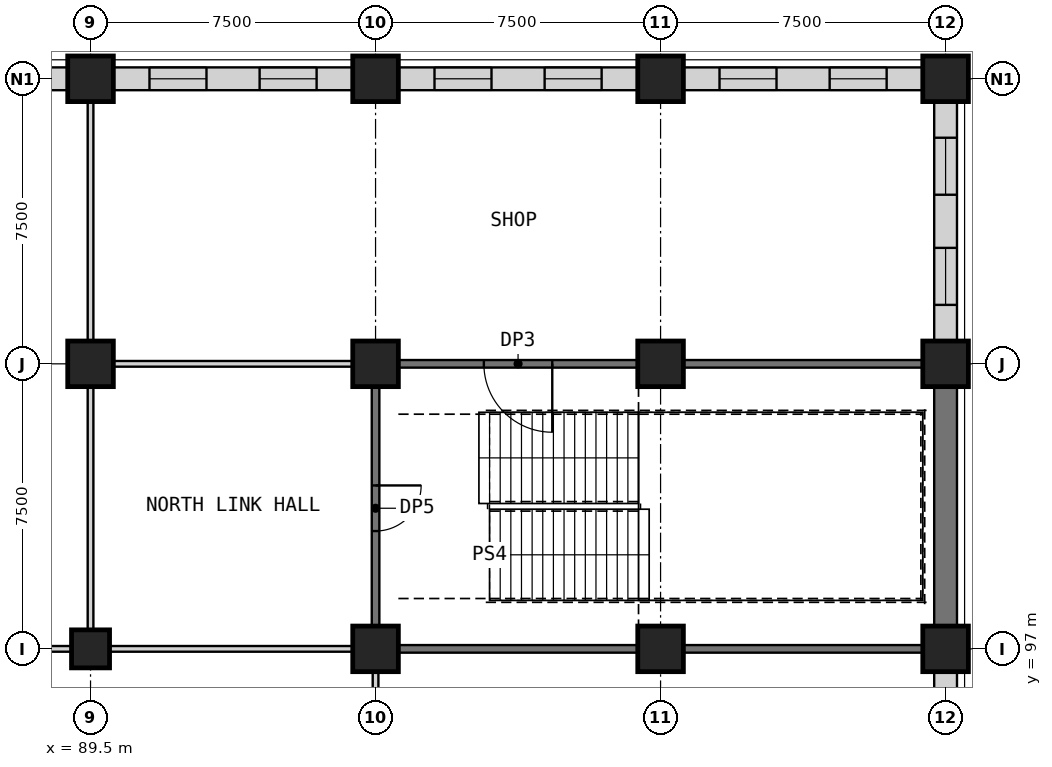
"""IFC4 building model, lengths in metres.
Left out: names, types, materials, properties, quantities, classifications, styles, units other than length and angle.
Written with IfcOpenShell. Run it as: python <this file> out.ifc"""

import sys

from ifc_helpers import new_model, si_unit, direction, frame, frame_2d, origin, origin_2d, place, context, subcontext, project, spatial, rectangle, extrude, element, fill, save


model = new_model("IFC4")
c1 = context("Model", 3, precision=1e-05, world=origin(), true_north=direction((0.0, 1.0)))
c2 = subcontext(c1, "Body", "Model", "MODEL_VIEW")
j1 = project(units=[si_unit("LENGTHUNIT", "METRE"), si_unit("PLANEANGLEUNIT", "RADIAN")], contexts=[c1])
p1 = place(None, origin())
s1 = spatial("IfcSite", under=j1, at=p1, CompositionType="ELEMENT")
p2 = place(p1, origin())
s2 = spatial("IfcBuilding", under=s1, at=p2, CompositionType="ELEMENT")
p3 = place(p2, frame((0.0, 0.0, 13.5)))
s3 = spatial("IfcBuildingStorey", under=s2, at=p3, CompositionType="ELEMENT", Elevation=13.5)
p4 = place(p3, frame((89.5, 97.0, 0.0), z_axis=(0.0, 0.0, 1.0), x_axis=(1.0, 0.0, 0.0)))
e1 = element("IfcColumn", 1, at=p4, inside=s3, PredefinedType="COLUMN", context=c2, shape_type="SweptSolid", body=[
    extrude(rectangle(XDim=1.0, YDim=1.0, at=origin_2d()), origin(), (0.0, 0.0, 1.0), 5.0),
])
for number, where, z_axis, x_axis in (
    (2, (89.5, 104.5, 0.0), (0.0, 0.0, 1.0), (1.0, 0.0, 0.0)),
    (3, (89.5, 112.0, 0.0), (0.0, 0.0, 1.0), (1.0, 0.0, 0.0)),
    (4, (97.0, 97.0, 0.0), (0.0, 0.0, 1.0), (1.0, 0.0, 0.0)),
    (5, (97.0, 104.5, 0.0), (0.0, 0.0, 1.0), (1.0, 0.0, 0.0)),
    (6, (97.0, 112.0, 0.0), (0.0, 0.0, 1.0), (1.0, 0.0, 0.0)),
    (7, (104.5, 97.0, 0.0), (0.0, 0.0, 1.0), (1.0, 0.0, 0.0)),
    (8, (104.5, 104.5, 0.0), (0.0, 0.0, 1.0), (1.0, 0.0, 0.0)),
    (9, (104.5, 112.0, 0.0), (0.0, 0.0, 1.0), (1.0, 0.0, 0.0)),
    (10, (112.0, 97.0, 0.0), (0.0, 0.0, 1.0), (1.0, 0.0, 0.0)),
    (11, (112.0, 104.5, 0.0), (0.0, 0.0, 1.0), (1.0, 0.0, 0.0)),
    (12, (112.0, 112.0, 0.0), (0.0, 0.0, 1.0), (1.0, 0.0, 0.0)),
):
    element("IfcColumn", number, at=place(p3, frame(where, z_axis=z_axis, x_axis=x_axis)), inside=s3, PredefinedType="COLUMN", context=c2, shape_type="SweptSolid", body=[
        extrude(rectangle(XDim=1.2, YDim=1.2, at=origin_2d()), origin(), (0.0, 0.0, 1.0), 5.0),
    ])
for number, where, z_axis, x_axis in (
    (13, (82.6, 97.0, 0.0), (0.0, 0.0, 1.0), (1.0, 0.0, 0.0)),
    (14, (90.0, 97.0, 0.0), (0.0, 0.0, 1.0), (1.0, 0.0, 0.0)),
):
    element("IfcWall", number, at=place(p3, frame(where, z_axis=z_axis, x_axis=x_axis)), inside=s3, PredefinedType="PARTITIONING", context=c2, shape_type="SweptSolid", body=[
        extrude(rectangle(XDim=6.4, YDim=0.15, at=frame_2d((3.2, 0.0))), origin(), (0.0, 0.0, 1.0), 4.7),
    ])
for number, where, z_axis, x_axis in (
    (15, (97.6, 97.0, 0.0), (0.0, 0.0, 1.0), (1.0, 0.0, 0.0)),
    (16, (105.1, 97.0, 0.0), (0.0, 0.0, 1.0), (1.0, 0.0, 0.0)),
):
    element("IfcWall", number, at=place(p3, frame(where, z_axis=z_axis, x_axis=x_axis)), inside=s3, PredefinedType="SHEAR", context=c2, shape_type="SweptSolid", body=[
        extrude(rectangle(XDim=6.3, YDim=0.2, at=frame_2d((3.15, 0.0))), origin(), (0.0, 0.0, 1.0), 4.7),
    ])
p5 = place(p3, frame((82.6, 112.0, 0.0), z_axis=(0.0, 0.0, 1.0), x_axis=(1.0, 0.0, 0.0)))
e17 = element("IfcWall", 17, at=p5, inside=s3, PredefinedType="PARTITIONING", context=c2, shape_type="SweptSolid", body=[
    extrude(rectangle(XDim=6.3, YDim=0.6, at=frame_2d((3.15, 0.0))), origin(), (0.0, 0.0, 1.0), 4.1),
])
p6 = place(p5, frame((0.951, 0.0, 0.9)))
e18 = element("IfcOpeningElement", 18, at=p6, cuts=e17, PredefinedType="OPENING", context=c2, shape_type="SweptSolid", body=[
    extrude(rectangle(XDim=1.5, YDim=2.8, at=frame_2d((0.75, 1.4))), frame((0.0, 0.31, 0.0), z_axis=(0.0, -1.0, 0.0), x_axis=(1.0, 0.0, 0.0)), (0.0, 0.0, 1.0), 0.62),
])
p7 = place(p5, frame((3.849, 0.0, 0.9)))
e19 = element("IfcOpeningElement", 19, at=p7, cuts=e17, PredefinedType="OPENING", context=c2, shape_type="SweptSolid", body=[
    extrude(rectangle(XDim=1.5, YDim=2.8, at=frame_2d((0.75, 1.4))), frame((0.0, 0.31, 0.0), z_axis=(0.0, -1.0, 0.0), x_axis=(1.0, 0.0, 0.0)), (0.0, 0.0, 1.0), 0.62),
])
p8 = place(p3, frame((90.1, 112.0, 0.0), z_axis=(0.0, 0.0, 1.0), x_axis=(1.0, 0.0, 0.0)))
e20 = element("IfcWall", 20, at=p8, inside=s3, PredefinedType="PARTITIONING", context=c2, shape_type="SweptSolid", body=[
    extrude(rectangle(XDim=6.3, YDim=0.6, at=frame_2d((3.15, 0.0))), origin(), (0.0, 0.0, 1.0), 4.1),
])
p9 = place(p8, frame((0.951, 0.0, 0.9)))
e21 = element("IfcOpeningElement", 21, at=p9, cuts=e20, PredefinedType="OPENING", context=c2, shape_type="SweptSolid", body=[
    extrude(rectangle(XDim=1.5, YDim=2.8, at=frame_2d((0.75, 1.4))), frame((0.0, 0.31, 0.0), z_axis=(0.0, -1.0, 0.0), x_axis=(1.0, 0.0, 0.0)), (0.0, 0.0, 1.0), 0.62),
])
p10 = place(p8, frame((3.849, 0.0, 0.9)))
e22 = element("IfcOpeningElement", 22, at=p10, cuts=e20, PredefinedType="OPENING", context=c2, shape_type="SweptSolid", body=[
    extrude(rectangle(XDim=1.5, YDim=2.8, at=frame_2d((0.75, 1.4))), frame((0.0, 0.31, 0.0), z_axis=(0.0, -1.0, 0.0), x_axis=(1.0, 0.0, 0.0)), (0.0, 0.0, 1.0), 0.62),
])
p11 = place(p3, frame((97.6, 112.0, 0.0), z_axis=(0.0, 0.0, 1.0), x_axis=(1.0, 0.0, 0.0)))
e23 = element("IfcWall", 23, at=p11, inside=s3, PredefinedType="PARTITIONING", context=c2, shape_type="SweptSolid", body=[
    extrude(rectangle(XDim=6.3, YDim=0.6, at=frame_2d((3.15, 0.0))), origin(), (0.0, 0.0, 1.0), 4.1),
])
p12 = place(p11, frame((0.951, 0.0, 0.9)))
e24 = element("IfcOpeningElement", 24, at=p12, cuts=e23, PredefinedType="OPENING", context=c2, shape_type="SweptSolid", body=[
    extrude(rectangle(XDim=1.5, YDim=2.8, at=frame_2d((0.75, 1.4))), frame((0.0, 0.31, 0.0), z_axis=(0.0, -1.0, 0.0), x_axis=(1.0, 0.0, 0.0)), (0.0, 0.0, 1.0), 0.62),
])
p13 = place(p11, frame((3.849, 0.0, 0.9)))
e25 = element("IfcOpeningElement", 25, at=p13, cuts=e23, PredefinedType="OPENING", context=c2, shape_type="SweptSolid", body=[
    extrude(rectangle(XDim=1.5, YDim=2.8, at=frame_2d((0.75, 1.4))), frame((0.0, 0.31, 0.0), z_axis=(0.0, -1.0, 0.0), x_axis=(1.0, 0.0, 0.0)), (0.0, 0.0, 1.0), 0.62),
])
p14 = place(p3, frame((105.1, 112.0, 0.0), z_axis=(0.0, 0.0, 1.0), x_axis=(1.0, 0.0, 0.0)))
e26 = element("IfcWall", 26, at=p14, inside=s3, PredefinedType="PARTITIONING", context=c2, shape_type="SweptSolid", body=[
    extrude(rectangle(XDim=6.3, YDim=0.6, at=frame_2d((3.15, 0.0))), origin(), (0.0, 0.0, 1.0), 4.1),
])
p15 = place(p14, frame((0.951, 0.0, 0.9)))
e27 = element("IfcOpeningElement", 27, at=p15, cuts=e26, PredefinedType="OPENING", context=c2, shape_type="SweptSolid", body=[
    extrude(rectangle(XDim=1.5, YDim=2.8, at=frame_2d((0.75, 1.4))), frame((0.0, 0.31, 0.0), z_axis=(0.0, -1.0, 0.0), x_axis=(1.0, 0.0, 0.0)), (0.0, 0.0, 1.0), 0.62),
])
p16 = place(p14, frame((3.849, 0.0, 0.9)))
e28 = element("IfcOpeningElement", 28, at=p16, cuts=e26, PredefinedType="OPENING", context=c2, shape_type="SweptSolid", body=[
    extrude(rectangle(XDim=1.5, YDim=2.8, at=frame_2d((0.75, 1.4))), frame((0.0, 0.31, 0.0), z_axis=(0.0, -1.0, 0.0), x_axis=(1.0, 0.0, 0.0)), (0.0, 0.0, 1.0), 0.62),
])
p17 = place(p3, frame((90.1, 104.5, 0.0), z_axis=(0.0, 0.0, 1.0), x_axis=(1.0, 0.0, 0.0)))
e29 = element("IfcWall", 29, at=p17, inside=s3, PredefinedType="PARTITIONING", context=c2, shape_type="SweptSolid", body=[
    extrude(rectangle(XDim=6.3, YDim=0.15, at=frame_2d((3.15, 0.0))), origin(), (0.0, 0.0, 1.0), 4.7),
])
p18 = place(p3, frame((103.9, 104.5, 0.0), z_axis=(0.0, 0.0, 1.0), x_axis=(-1.0, 0.0, 0.0)))
e30 = element("IfcWall", 30, at=p18, inside=s3, PredefinedType="SHEAR", context=c2, shape_type="SweptSolid", body=[
    extrude(rectangle(XDim=6.3, YDim=0.2, at=frame_2d((3.15, 0.0))), origin(), (0.0, 0.0, 1.0), 4.7),
])
p19 = place(p18, frame((2.25, 0.0, 0.0)))
e31 = element("IfcOpeningElement", 31, at=p19, cuts=e30, PredefinedType="OPENING", context=c2, shape_type="SweptSolid", body=[
    extrude(rectangle(XDim=1.8, YDim=2.4, at=frame_2d((0.9, 1.2))), frame((0.0, 0.11, 0.0), z_axis=(0.0, -1.0, 0.0), x_axis=(1.0, 0.0, 0.0)), (0.0, 0.0, 1.0), 0.22),
])
p20 = place(p3, frame((105.1, 104.5, 0.0), z_axis=(0.0, 0.0, 1.0), x_axis=(1.0, 0.0, 0.0)))
e32 = element("IfcWall", 32, at=p20, inside=s3, PredefinedType="SHEAR", context=c2, shape_type="SweptSolid", body=[
    extrude(rectangle(XDim=6.3, YDim=0.2, at=frame_2d((3.15, 0.0))), origin(), (0.0, 0.0, 1.0), 4.7),
])
p21 = place(p3, frame((97.0, 90.6, 0.0), z_axis=(0.0, 0.0, 1.0), x_axis=(0.0, 1.0, 0.0)))
e33 = element("IfcWall", 33, at=p21, inside=s3, PredefinedType="PARTITIONING", context=c2, shape_type="SweptSolid", body=[
    extrude(rectangle(XDim=5.8, YDim=0.15, at=frame_2d((2.9, 0.0))), origin(), (0.0, 0.0, 1.0), 4.7),
])
p22 = place(p3, frame((97.0, 103.9, 0.0), z_axis=(0.0, 0.0, 1.0), x_axis=(0.0, -1.0, 0.0)))
e34 = element("IfcWall", 34, at=p22, inside=s3, PredefinedType="SHEAR", context=c2, shape_type="SweptSolid", body=[
    extrude(rectangle(XDim=6.3, YDim=0.2, at=frame_2d((3.15, 0.0))), origin(), (0.0, 0.0, 1.0), 4.7),
])
p23 = place(p22, frame((2.6, 0.0, 0.0)))
e35 = element("IfcOpeningElement", 35, at=p23, cuts=e34, PredefinedType="OPENING", context=c2, shape_type="SweptSolid", body=[
    extrude(rectangle(XDim=1.2, YDim=2.1, at=frame_2d((0.6, 1.05))), frame((0.0, 0.11, 0.0), z_axis=(0.0, -1.0, 0.0), x_axis=(1.0, 0.0, 0.0)), (0.0, 0.0, 1.0), 0.22),
])
p24 = place(p3, frame((112.0, 90.6, 0.0), z_axis=(0.0, 0.0, 1.0), x_axis=(0.0, 1.0, 0.0)))
e36 = element("IfcWall", 36, at=p24, inside=s3, PredefinedType="PARTITIONING", context=c2, shape_type="SweptSolid", body=[
    extrude(rectangle(XDim=5.8, YDim=0.6, at=frame_2d((2.9, 0.0))), origin(), (0.0, 0.0, 1.0), 4.1),
])
p25 = place(p24, frame((0.816, 0.0, 0.9)))
e37 = element("IfcOpeningElement", 37, at=p25, cuts=e36, PredefinedType="OPENING", context=c2, shape_type="SweptSolid", body=[
    extrude(rectangle(XDim=1.5, YDim=2.8, at=frame_2d((0.75, 1.4))), frame((0.0, 0.31, 0.0), z_axis=(0.0, -1.0, 0.0), x_axis=(1.0, 0.0, 0.0)), (0.0, 0.0, 1.0), 0.62),
])
p26 = place(p24, frame((3.484, 0.0, 0.9)))
e38 = element("IfcOpeningElement", 38, at=p26, cuts=e36, PredefinedType="OPENING", context=c2, shape_type="SweptSolid", body=[
    extrude(rectangle(XDim=1.5, YDim=2.8, at=frame_2d((0.75, 1.4))), frame((0.0, 0.31, 0.0), z_axis=(0.0, -1.0, 0.0), x_axis=(1.0, 0.0, 0.0)), (0.0, 0.0, 1.0), 0.62),
])
p27 = place(p3, frame((112.0, 97.6, 0.0), z_axis=(0.0, 0.0, 1.0), x_axis=(0.0, 1.0, 0.0)))
e39 = element("IfcWall", 39, at=p27, inside=s3, PredefinedType="PARTITIONING", context=c2, shape_type="SweptSolid", body=[
    extrude(rectangle(XDim=6.3, YDim=0.6, at=frame_2d((3.15, 0.0))), origin(), (0.0, 0.0, 1.0), 4.1),
])
p28 = place(p3, frame((112.0, 105.1, 0.0), z_axis=(0.0, 0.0, 1.0), x_axis=(0.0, 1.0, 0.0)))
e40 = element("IfcWall", 40, at=p28, inside=s3, PredefinedType="PARTITIONING", context=c2, shape_type="SweptSolid", body=[
    extrude(rectangle(XDim=6.3, YDim=0.6, at=frame_2d((3.15, 0.0))), origin(), (0.0, 0.0, 1.0), 4.1),
])
p29 = place(p28, frame((0.951, 0.0, 0.9)))
e41 = element("IfcOpeningElement", 41, at=p29, cuts=e40, PredefinedType="OPENING", context=c2, shape_type="SweptSolid", body=[
    extrude(rectangle(XDim=1.5, YDim=2.8, at=frame_2d((0.75, 1.4))), frame((0.0, 0.31, 0.0), z_axis=(0.0, -1.0, 0.0), x_axis=(1.0, 0.0, 0.0)), (0.0, 0.0, 1.0), 0.62),
])
p30 = place(p28, frame((3.849, 0.0, 0.9)))
e42 = element("IfcOpeningElement", 42, at=p30, cuts=e40, PredefinedType="OPENING", context=c2, shape_type="SweptSolid", body=[
    extrude(rectangle(XDim=1.5, YDim=2.8, at=frame_2d((0.75, 1.4))), frame((0.0, 0.31, 0.0), z_axis=(0.0, -1.0, 0.0), x_axis=(1.0, 0.0, 0.0)), (0.0, 0.0, 1.0), 0.62),
])
p31 = place(p3, frame((89.5, 97.5, 0.0), z_axis=(0.0, 0.0, 1.0), x_axis=(0.0, 1.0, 0.0)))
e43 = element("IfcWall", 43, at=p31, inside=s3, PredefinedType="PARTITIONING", context=c2, shape_type="SweptSolid", body=[
    extrude(rectangle(XDim=6.4, YDim=0.15, at=frame_2d((3.2, 0.0))), origin(), (0.0, 0.0, 1.0), 4.7),
])
p32 = place(p3, frame((89.5, 105.1, 0.0), z_axis=(0.0, 0.0, 1.0), x_axis=(0.0, 1.0, 0.0)))
e44 = element("IfcWall", 44, at=p32, inside=s3, PredefinedType="PARTITIONING", context=c2, shape_type="SweptSolid", body=[
    extrude(rectangle(XDim=6.3, YDim=0.15, at=frame_2d((3.15, 0.0))), origin(), (0.0, 0.0, 1.0), 4.7),
])
p33 = place(p9, origin())
e45 = element("IfcWindow", 45, at=p33, inside=s3, PartitioningType="SINGLE_PANEL", PredefinedType="WINDOW", context=c2, shape_type="SweptSolid", body=[
    extrude(rectangle(XDim=1.5, YDim=2.8, at=frame_2d((0.75, 1.4))), frame((0.0, 0.03, 0.0), z_axis=(0.0, -1.0, 0.0), x_axis=(1.0, 0.0, 0.0)), (0.0, 0.0, 1.0), 0.06),
])
fill(e21, e45)
p34 = place(p10, origin())
e46 = element("IfcWindow", 46, at=p34, inside=s3, PartitioningType="SINGLE_PANEL", PredefinedType="WINDOW", context=c2, shape_type="SweptSolid", body=[
    extrude(rectangle(XDim=1.5, YDim=2.8, at=frame_2d((0.75, 1.4))), frame((0.0, 0.03, 0.0), z_axis=(0.0, -1.0, 0.0), x_axis=(1.0, 0.0, 0.0)), (0.0, 0.0, 1.0), 0.06),
])
fill(e22, e46)
p35 = place(p12, origin())
e47 = element("IfcWindow", 47, at=p35, inside=s3, PartitioningType="SINGLE_PANEL", PredefinedType="WINDOW", context=c2, shape_type="SweptSolid", body=[
    extrude(rectangle(XDim=1.5, YDim=2.8, at=frame_2d((0.75, 1.4))), frame((0.0, 0.03, 0.0), z_axis=(0.0, -1.0, 0.0), x_axis=(1.0, 0.0, 0.0)), (0.0, 0.0, 1.0), 0.06),
])
fill(e24, e47)
p36 = place(p13, origin())
e48 = element("IfcWindow", 48, at=p36, inside=s3, PartitioningType="SINGLE_PANEL", PredefinedType="WINDOW", context=c2, shape_type="SweptSolid", body=[
    extrude(rectangle(XDim=1.5, YDim=2.8, at=frame_2d((0.75, 1.4))), frame((0.0, 0.03, 0.0), z_axis=(0.0, -1.0, 0.0), x_axis=(1.0, 0.0, 0.0)), (0.0, 0.0, 1.0), 0.06),
])
fill(e25, e48)
p37 = place(p15, origin())
e49 = element("IfcWindow", 49, at=p37, inside=s3, PartitioningType="SINGLE_PANEL", PredefinedType="WINDOW", context=c2, shape_type="SweptSolid", body=[
    extrude(rectangle(XDim=1.5, YDim=2.8, at=frame_2d((0.75, 1.4))), frame((0.0, 0.03, 0.0), z_axis=(0.0, -1.0, 0.0), x_axis=(1.0, 0.0, 0.0)), (0.0, 0.0, 1.0), 0.06),
])
fill(e27, e49)
p38 = place(p16, origin())
e50 = element("IfcWindow", 50, at=p38, inside=s3, PartitioningType="SINGLE_PANEL", PredefinedType="WINDOW", context=c2, shape_type="SweptSolid", body=[
    extrude(rectangle(XDim=1.5, YDim=2.8, at=frame_2d((0.75, 1.4))), frame((0.0, 0.03, 0.0), z_axis=(0.0, -1.0, 0.0), x_axis=(1.0, 0.0, 0.0)), (0.0, 0.0, 1.0), 0.06),
])
fill(e28, e50)
p39 = place(p19, origin())
e51 = element("IfcDoor", 51, at=p39, inside=s3, OperationType="SINGLE_SWING_LEFT", PredefinedType="DOOR", context=c2, shape_type="SweptSolid", body=[
    extrude(rectangle(XDim=1.8, YDim=2.4, at=frame_2d((0.9, 1.2))), frame((0.0, 0.025, 0.0), z_axis=(0.0, -1.0, 0.0), x_axis=(1.0, 0.0, 0.0)), (0.0, 0.0, 1.0), 0.05),
])
fill(e31, e51)
p40 = place(p23, origin())
e52 = element("IfcDoor", 52, at=p40, inside=s3, OperationType="SINGLE_SWING_LEFT", PredefinedType="DOOR", context=c2, shape_type="SweptSolid", body=[
    extrude(rectangle(XDim=1.2, YDim=2.1, at=frame_2d((0.6, 1.05))), frame((0.0, 0.025, 0.0), z_axis=(0.0, -1.0, 0.0), x_axis=(1.0, 0.0, 0.0)), (0.0, 0.0, 1.0), 0.05),
])
fill(e35, e52)
p41 = place(p29, origin())
e53 = element("IfcWindow", 53, at=p41, inside=s3, PartitioningType="SINGLE_PANEL", PredefinedType="WINDOW", context=c2, shape_type="SweptSolid", body=[
    extrude(rectangle(XDim=1.5, YDim=2.8, at=frame_2d((0.75, 1.4))), frame((0.0, 0.03, 0.0), z_axis=(0.0, -1.0, 0.0), x_axis=(1.0, 0.0, 0.0)), (0.0, 0.0, 1.0), 0.06),
])
fill(e41, e53)
p42 = place(p30, origin())
e54 = element("IfcWindow", 54, at=p42, inside=s3, PartitioningType="SINGLE_PANEL", PredefinedType="WINDOW", context=c2, shape_type="SweptSolid", body=[
    extrude(rectangle(XDim=1.5, YDim=2.8, at=frame_2d((0.75, 1.4))), frame((0.0, 0.03, 0.0), z_axis=(0.0, -1.0, 0.0), x_axis=(1.0, 0.0, 0.0)), (0.0, 0.0, 1.0), 0.06),
])
fill(e42, e54)
save(model, sys.argv[1])
